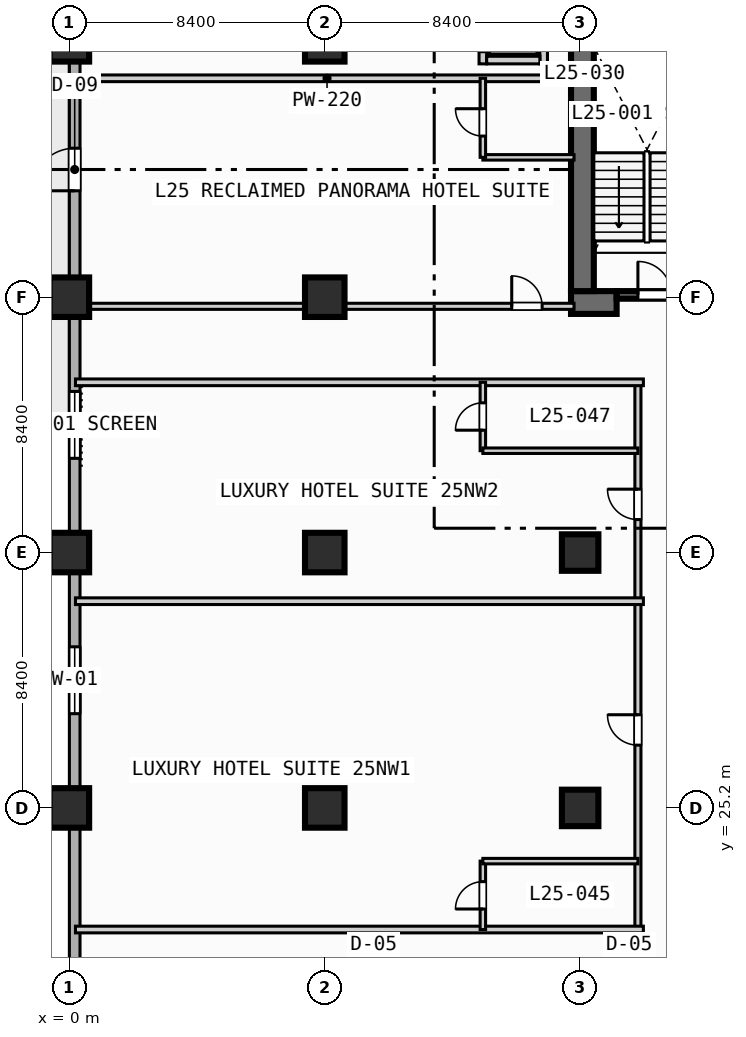
"""IFC4 building model, lengths in metres.
Left out: names, types, materials, properties, quantities, classifications, styles, units other than length and angle.
Written with IfcOpenShell. Run it as: python <this file> out.ifc"""

import sys

from ifc_helpers import new_model, si_unit, direction, frame, frame_2d, origin, origin_2d, place, context, subcontext, project, spatial, rectangle, extrude, element, fill, save


model = new_model("IFC4")
c1 = context("Model", 3, precision=1e-05, world=origin(), true_north=direction((0.0, 1.0)))
c2 = subcontext(c1, "Body", "Model", "MODEL_VIEW")
j1 = project(units=[si_unit("LENGTHUNIT", "METRE"), si_unit("PLANEANGLEUNIT", "RADIAN")], contexts=[c1])
p1 = place(None, origin())
s1 = spatial("IfcSite", under=j1, at=p1, CompositionType="ELEMENT")
p2 = place(p1, origin())
s2 = spatial("IfcBuilding", under=s1, at=p2, CompositionType="ELEMENT")
p3 = place(p2, frame((0.0, 0.0, 107.6)))
s3 = spatial("IfcBuildingStorey", under=s2, at=p3, CompositionType="ELEMENT", Elevation=107.6)
p4 = place(p3, frame((16.5, 41.825, 0.0), z_axis=(0.0, 0.0, 1.0), x_axis=(1.0, 0.0, 0.0)))
e1 = element("IfcWall", 1, at=p4, inside=s3, PredefinedType="SHEAR", context=c2, shape_type="SweptSolid", body=[
    extrude(rectangle(XDim=1.5, YDim=0.75, at=frame_2d((0.75, 0.0))), origin(), (0.0, 0.0, 1.0), 3.55),
])
p5 = place(p3, frame((16.875, 42.2, 0.0), z_axis=(0.0, 0.0, 1.0), x_axis=(0.0, 1.0, 0.0)))
e2 = element("IfcWall", 2, at=p5, inside=s3, PredefinedType="SHEAR", context=c2, shape_type="SweptSolid", body=[
    extrude(rectangle(XDim=16.35, YDim=0.75, at=frame_2d((8.175, 0.0))), origin(), (0.0, 0.0, 1.0), 3.55),
])
for number, where, z_axis, x_axis in (
    (3, (0.0, 25.2, 0.0), (0.0, 0.0, 1.0), (1.0, 0.0, 0.0)),
    (4, (0.0, 33.6, 0.0), (0.0, 0.0, 1.0), (1.0, 0.0, 0.0)),
    (5, (0.0, 42.0, 0.0), (0.0, 0.0, 1.0), (1.0, 0.0, 0.0)),
    (6, (0.0, 50.4, 0.0), (0.0, 0.0, 1.0), (1.0, 0.0, 0.0)),
    (7, (8.4, 25.2, 0.0), (0.0, 0.0, 1.0), (1.0, 0.0, 0.0)),
    (8, (8.4, 33.6, 0.0), (0.0, 0.0, 1.0), (1.0, 0.0, 0.0)),
    (9, (8.4, 42.0, 0.0), (0.0, 0.0, 1.0), (1.0, 0.0, 0.0)),
    (10, (8.4, 50.4, 0.0), (0.0, 0.0, 1.0), (1.0, 0.0, 0.0)),
):
    element("IfcColumn", number, at=place(p3, frame(where, z_axis=z_axis, x_axis=x_axis)), inside=s3, PredefinedType="COLUMN", context=c2, shape_type="SweptSolid", body=[
        extrude(rectangle(XDim=1.3, YDim=1.3, at=origin_2d()), origin(), (0.0, 0.0, 1.0), 3.8),
    ])
for number, where, z_axis, x_axis in (
    (11, (16.8, 25.2, 0.0), (0.0, 0.0, 1.0), (1.0, 0.0, 0.0)),
    (12, (16.8, 33.6, 0.0), (0.0, 0.0, 1.0), (1.0, 0.0, 0.0)),
):
    element("IfcColumn", number, at=place(p3, frame(where, z_axis=z_axis, x_axis=x_axis)), inside=s3, PredefinedType="COLUMN", context=c2, shape_type="SweptSolid", body=[
        extrude(rectangle(XDim=1.2, YDim=1.2, at=origin_2d()), origin(), (0.0, 0.0, 1.0), 3.8),
    ])
p6 = place(p3, frame((0.175, 3.175, 0.0), z_axis=(0.0, 0.0, 1.0), x_axis=(0.0, 1.0, 0.0)))
e13 = element("IfcWall", 13, at=p6, inside=s3, PredefinedType="STANDARD", context=c2, shape_type="SweptSolid", body=[
    extrude(rectangle(XDim=86.05, YDim=0.35, at=frame_2d((43.025, 0.0))), origin(), (0.0, 0.0, 1.0), 3.55),
])
p7 = place(p6, frame((42.325, 0.0, 0.0)))
e14 = element("IfcOpeningElement", 14, at=p7, cuts=e13, PredefinedType="OPENING", context=c2, shape_type="SweptSolid", body=[
    extrude(rectangle(XDim=1.4, YDim=2.2, at=frame_2d((0.7, 1.1))), frame((0.0, 0.185, 0.0), z_axis=(0.0, -1.0, 0.0), x_axis=(1.0, 0.0, 0.0)), (0.0, 0.0, 1.0), 0.37),
])
p8 = place(p6, frame((25.125, 0.0, 0.85)))
e15 = element("IfcOpeningElement", 15, at=p8, cuts=e13, PredefinedType="OPENING", context=c2, shape_type="SweptSolid", body=[
    extrude(rectangle(XDim=2.2, YDim=1.8, at=frame_2d((1.1, 0.9))), frame((0.0, 0.185, 0.0), z_axis=(0.0, -1.0, 0.0), x_axis=(1.0, 0.0, 0.0)), (0.0, 0.0, 1.0), 0.37),
])
p9 = place(p6, frame((33.525, 0.0, 0.85)))
e16 = element("IfcOpeningElement", 16, at=p9, cuts=e13, PredefinedType="OPENING", context=c2, shape_type="SweptSolid", body=[
    extrude(rectangle(XDim=2.2, YDim=1.8, at=frame_2d((1.1, 0.9))), frame((0.0, 0.185, 0.0), z_axis=(0.0, -1.0, 0.0), x_axis=(1.0, 0.0, 0.0)), (0.0, 0.0, 1.0), 0.37),
])
p10 = place(p6, frame((58.725, 0.0, 0.85)))
e17 = element("IfcOpeningElement", 17, at=p10, cuts=e13, PredefinedType="OPENING", context=c2, shape_type="SweptSolid", body=[
    extrude(rectangle(XDim=2.2, YDim=1.8, at=frame_2d((1.1, 0.9))), frame((0.0, 0.185, 0.0), z_axis=(0.0, -1.0, 0.0), x_axis=(1.0, 0.0, 0.0)), (0.0, 0.0, 1.0), 0.37),
])
p11 = place(p6, frame((65.125, 0.0, 0.85)))
e18 = element("IfcOpeningElement", 18, at=p11, cuts=e13, PredefinedType="OPENING", context=c2, shape_type="SweptSolid", body=[
    extrude(rectangle(XDim=1.8, YDim=1.8, at=frame_2d((0.9, 0.9))), frame((0.0, 0.185, 0.0), z_axis=(0.0, -1.0, 0.0), x_axis=(1.0, 0.0, 0.0)), (0.0, 0.0, 1.0), 0.37),
])
p12 = place(p6, frame((73.275, 0.0, 0.85)))
e19 = element("IfcOpeningElement", 19, at=p12, cuts=e13, PredefinedType="OPENING", context=c2, shape_type="SweptSolid", body=[
    extrude(rectangle(XDim=1.8, YDim=1.8, at=frame_2d((0.9, 0.9))), frame((0.0, 0.185, 0.0), z_axis=(0.0, -1.0, 0.0), x_axis=(1.0, 0.0, 0.0)), (0.0, 0.0, 1.0), 0.37),
])
p13 = place(p6, frame((81.625, 0.0, 0.85)))
e20 = element("IfcOpeningElement", 20, at=p13, cuts=e13, PredefinedType="OPENING", context=c2, shape_type="SweptSolid", body=[
    extrude(rectangle(XDim=1.8, YDim=1.8, at=frame_2d((0.9, 0.9))), frame((0.0, 0.185, 0.0), z_axis=(0.0, -1.0, 0.0), x_axis=(1.0, 0.0, 0.0)), (0.0, 0.0, 1.0), 0.37),
])
p14 = place(p3, frame((18.0, 42.075, 0.0), z_axis=(0.0, 0.0, 1.0), x_axis=(1.0, 0.0, 0.0)))
e21 = element("IfcWall", 21, at=p14, inside=s3, PredefinedType="SOLIDWALL", context=c2, shape_type="SweptSolid", body=[
    extrude(rectangle(XDim=2.5, YDim=0.25, at=frame_2d((1.25, 0.0))), origin(), (0.0, 0.0, 1.0), 3.55),
])
p15 = place(p14, frame((0.7, 0.0, 0.0)))
e22 = element("IfcOpeningElement", 22, at=p15, cuts=e21, PredefinedType="OPENING", context=c2, shape_type="SweptSolid", body=[
    extrude(rectangle(XDim=1.1, YDim=2.15, at=frame_2d((0.55, 1.075))), frame((0.0, 0.135, 0.0), z_axis=(0.0, -1.0, 0.0), x_axis=(1.0, 0.0, 0.0)), (0.0, 0.0, 1.0), 0.27),
])
p16 = place(p3, frame((13.6, 49.675, 0.0), z_axis=(0.0, 0.0, 1.0), x_axis=(0.0, 1.0, 0.0)))
e23 = element("IfcWall", 23, at=p16, inside=s3, PredefinedType="SOLIDWALL", context=c2, shape_type="SweptSolid", body=[
    extrude(rectangle(XDim=2.75, YDim=0.25, at=frame_2d((1.375, 0.0))), origin(), (0.0, 0.0, 1.0), 3.55),
])
p17 = place(p16, frame((0.4, 0.0, 0.0)))
e24 = element("IfcOpeningElement", 24, at=p17, cuts=e23, PredefinedType="OPENING", context=c2, shape_type="SweptSolid", body=[
    extrude(rectangle(XDim=1.1, YDim=2.15, at=frame_2d((0.55, 1.075))), frame((0.0, 0.135, 0.0), z_axis=(0.0, -1.0, 0.0), x_axis=(1.0, 0.0, 0.0)), (0.0, 0.0, 1.0), 0.27),
])
p18 = place(p3, frame((15.6, 49.675, 0.0), z_axis=(0.0, 0.0, 1.0), x_axis=(0.0, 1.0, 0.0)))
e25 = element("IfcWall", 25, at=p18, inside=s3, PredefinedType="SOLIDWALL", context=c2, shape_type="SweptSolid", body=[
    extrude(rectangle(XDim=2.75, YDim=0.25, at=frame_2d((1.375, 0.0))), origin(), (0.0, 0.0, 1.0), 3.55),
])
p19 = place(p3, frame((13.725, 49.8, 0.0), z_axis=(0.0, 0.0, 1.0), x_axis=(1.0, 0.0, 0.0)))
e26 = element("IfcWall", 26, at=p19, inside=s3, PredefinedType="SOLIDWALL", context=c2, shape_type="SweptSolid", body=[
    extrude(rectangle(XDim=1.75, YDim=0.25, at=frame_2d((0.875, 0.0))), origin(), (0.0, 0.0, 1.0), 3.55),
])
p20 = place(p3, frame((0.35, 41.7, 0.0), z_axis=(0.0, 0.0, 1.0), x_axis=(1.0, 0.0, 0.0)))
e27 = element("IfcWall", 27, at=p20, inside=s3, PredefinedType="PARTITIONING", context=c2, shape_type="SweptSolid", body=[
    extrude(rectangle(XDim=16.25, YDim=0.2, at=frame_2d((8.125, 0.0))), origin(), (0.0, 0.0, 1.0), 2.8),
])
p21 = place(p20, frame((14.2, 0.0, 0.0)))
e28 = element("IfcOpeningElement", 28, at=p21, cuts=e27, PredefinedType="OPENING", context=c2, shape_type="SweptSolid", body=[
    extrude(rectangle(XDim=1.0, YDim=2.15, at=frame_2d((0.5, 1.075))), frame((0.0, 0.11, 0.0), z_axis=(0.0, -1.0, 0.0), x_axis=(1.0, 0.0, 0.0)), (0.0, 0.0, 1.0), 0.22),
])
p22 = place(p3, frame((0.35, 49.2, 0.0), z_axis=(0.0, 0.0, 1.0), x_axis=(1.0, 0.0, 0.0)))
e29 = element("IfcWall", 29, at=p22, inside=s3, PredefinedType="PARTITIONING", context=c2, shape_type="SweptSolid", body=[
    extrude(rectangle(XDim=16.25, YDim=0.22, at=frame_2d((8.125, 0.0))), origin(), (0.0, 0.0, 1.0), 3.55),
])
p23 = place(p3, frame((13.6, 46.6, 0.0), z_axis=(0.0, 0.0, 1.0), x_axis=(1.0, 0.0, 0.0)))
e30 = element("IfcWall", 30, at=p23, inside=s3, PredefinedType="PLUMBINGWALL", context=c2, shape_type="SweptSolid", body=[
    extrude(rectangle(XDim=3.0, YDim=0.18, at=frame_2d((1.5, 0.0))), origin(), (0.0, 0.0, 1.0), 3.55),
])
p24 = place(p3, frame((13.6, 46.6, 0.0), z_axis=(0.0, 0.0, 1.0), x_axis=(0.0, 1.0, 0.0)))
e31 = element("IfcWall", 31, at=p24, inside=s3, PredefinedType="PLUMBINGWALL", context=c2, shape_type="SweptSolid", body=[
    extrude(rectangle(XDim=2.6, YDim=0.18, at=frame_2d((1.3, 0.0))), origin(), (0.0, 0.0, 1.0), 3.55),
])
p25 = place(p24, frame((0.7, 0.0, 0.0)))
e32 = element("IfcOpeningElement", 32, at=p25, cuts=e31, PredefinedType="OPENING", context=c2, shape_type="SweptSolid", body=[
    extrude(rectangle(XDim=0.9, YDim=2.1, at=frame_2d((0.45, 1.05))), frame((0.0, 0.1, 0.0), z_axis=(0.0, -1.0, 0.0), x_axis=(1.0, 0.0, 0.0)), (0.0, 0.0, 1.0), 0.2),
])
p26 = place(p3, frame((18.7, 21.2, 0.0), z_axis=(0.0, 0.0, 1.0), x_axis=(0.0, 1.0, 0.0)))
e33 = element("IfcWall", 33, at=p26, inside=s3, PredefinedType="PARTITIONING", context=c2, shape_type="SweptSolid", body=[
    extrude(rectangle(XDim=18.0, YDim=0.2, at=frame_2d((9.0, 0.0))), origin(), (0.0, 0.0, 1.0), 3.55),
])
p27 = place(p26, frame((6.065, 0.0, 0.0)))
e34 = element("IfcOpeningElement", 34, at=p27, cuts=e33, PredefinedType="OPENING", context=c2, shape_type="SweptSolid", body=[
    extrude(rectangle(XDim=1.0, YDim=2.15, at=frame_2d((0.5, 1.075))), frame((0.0, 0.11, 0.0), z_axis=(0.0, -1.0, 0.0), x_axis=(1.0, 0.0, 0.0)), (0.0, 0.0, 1.0), 0.22),
])
p28 = place(p26, frame((13.485, 0.0, 0.0)))
e35 = element("IfcOpeningElement", 35, at=p28, cuts=e33, PredefinedType="OPENING", context=c2, shape_type="SweptSolid", body=[
    extrude(rectangle(XDim=1.0, YDim=2.15, at=frame_2d((0.5, 1.075))), frame((0.0, 0.11, 0.0), z_axis=(0.0, -1.0, 0.0), x_axis=(1.0, 0.0, 0.0)), (0.0, 0.0, 1.0), 0.22),
])
p29 = place(p3, frame((0.2, 21.2, 0.0), z_axis=(0.0, 0.0, 1.0), x_axis=(1.0, 0.0, 0.0)))
e36 = element("IfcWall", 36, at=p29, inside=s3, PredefinedType="PARTITIONING", context=c2, shape_type="SweptSolid", body=[
    extrude(rectangle(XDim=18.68, YDim=0.22, at=frame_2d((9.34, 0.0))), origin(), (0.0, 0.0, 1.0), 3.55),
])
p30 = place(p3, frame((13.6, 21.2, 0.0), z_axis=(0.0, 0.0, 1.0), x_axis=(0.0, 1.0, 0.0)))
e37 = element("IfcWall", 37, at=p30, inside=s3, PredefinedType="PLUMBINGWALL", context=c2, shape_type="SweptSolid", body=[
    extrude(rectangle(XDim=2.25, YDim=0.18, at=frame_2d((1.125, 0.0))), origin(), (0.0, 0.0, 1.0), 3.55),
])
p31 = place(p30, frame((0.675, 0.0, 0.0)))
e38 = element("IfcOpeningElement", 38, at=p31, cuts=e37, PredefinedType="OPENING", context=c2, shape_type="SweptSolid", body=[
    extrude(rectangle(XDim=0.9, YDim=2.1, at=frame_2d((0.45, 1.05))), frame((0.0, 0.1, 0.0), z_axis=(0.0, -1.0, 0.0), x_axis=(1.0, 0.0, 0.0)), (0.0, 0.0, 1.0), 0.2),
])
p32 = place(p3, frame((13.6, 23.45, 0.0), z_axis=(0.0, 0.0, 1.0), x_axis=(1.0, 0.0, 0.0)))
e39 = element("IfcWall", 39, at=p32, inside=s3, PredefinedType="PLUMBINGWALL", context=c2, shape_type="SweptSolid", body=[
    extrude(rectangle(XDim=5.1, YDim=0.18, at=frame_2d((2.55, 0.0))), origin(), (0.0, 0.0, 1.0), 3.55),
])
for number, where, z_axis, x_axis in (
    (40, (0.2, 32.0, 0.0), (0.0, 0.0, 1.0), (1.0, 0.0, 0.0)),
    (41, (0.2, 39.2, 0.0), (0.0, 0.0, 1.0), (1.0, 0.0, 0.0)),
):
    element("IfcWall", number, at=place(p3, frame(where, z_axis=z_axis, x_axis=x_axis)), inside=s3, PredefinedType="PARTITIONING", context=c2, shape_type="SweptSolid", body=[
        extrude(rectangle(XDim=18.68, YDim=0.22, at=frame_2d((9.34, 0.0))), origin(), (0.0, 0.0, 1.0), 3.55),
    ])
p33 = place(p3, frame((13.6, 36.95, 0.0), z_axis=(0.0, 0.0, 1.0), x_axis=(0.0, 1.0, 0.0)))
e42 = element("IfcWall", 42, at=p33, inside=s3, PredefinedType="PLUMBINGWALL", context=c2, shape_type="SweptSolid", body=[
    extrude(rectangle(XDim=2.25, YDim=0.18, at=frame_2d((1.125, 0.0))), origin(), (0.0, 0.0, 1.0), 3.55),
])
p34 = place(p33, frame((0.675, 0.0, 0.0)))
e43 = element("IfcOpeningElement", 43, at=p34, cuts=e42, PredefinedType="OPENING", context=c2, shape_type="SweptSolid", body=[
    extrude(rectangle(XDim=0.9, YDim=2.1, at=frame_2d((0.45, 1.05))), frame((0.0, 0.1, 0.0), z_axis=(0.0, -1.0, 0.0), x_axis=(1.0, 0.0, 0.0)), (0.0, 0.0, 1.0), 0.2),
])
p35 = place(p3, frame((13.6, 36.95, 0.0), z_axis=(0.0, 0.0, 1.0), x_axis=(1.0, 0.0, 0.0)))
e44 = element("IfcWall", 44, at=p35, inside=s3, PredefinedType="PLUMBINGWALL", context=c2, shape_type="SweptSolid", body=[
    extrude(rectangle(XDim=5.1, YDim=0.18, at=frame_2d((2.55, 0.0))), origin(), (0.0, 0.0, 1.0), 3.55),
])
p36 = place(p7, origin())
e45 = element("IfcDoor", 45, at=p36, inside=s3, OperationType="SINGLE_SWING_LEFT", PredefinedType="DOOR", context=c2, shape_type="SweptSolid", body=[
    extrude(rectangle(XDim=1.4, YDim=2.2, at=frame_2d((0.7, 1.1))), frame((0.0, 0.025, 0.0), z_axis=(0.0, -1.0, 0.0), x_axis=(1.0, 0.0, 0.0)), (0.0, 0.0, 1.0), 0.05),
])
fill(e14, e45)
p37 = place(p8, origin())
e46 = element("IfcWindow", 46, at=p37, inside=s3, PartitioningType="SINGLE_PANEL", PredefinedType="WINDOW", context=c2, shape_type="SweptSolid", body=[
    extrude(rectangle(XDim=2.2, YDim=1.8, at=frame_2d((1.1, 0.9))), frame((0.0, 0.03, 0.0), z_axis=(0.0, -1.0, 0.0), x_axis=(1.0, 0.0, 0.0)), (0.0, 0.0, 1.0), 0.06),
])
fill(e15, e46)
p38 = place(p9, origin())
e47 = element("IfcWindow", 47, at=p38, inside=s3, PartitioningType="SINGLE_PANEL", PredefinedType="WINDOW", context=c2, shape_type="SweptSolid", body=[
    extrude(rectangle(XDim=2.2, YDim=1.8, at=frame_2d((1.1, 0.9))), frame((0.0, 0.03, 0.0), z_axis=(0.0, -1.0, 0.0), x_axis=(1.0, 0.0, 0.0)), (0.0, 0.0, 1.0), 0.06),
])
fill(e16, e47)
p39 = place(p15, origin())
e48 = element("IfcDoor", 48, at=p39, inside=s3, OperationType="SINGLE_SWING_LEFT", PredefinedType="DOOR", context=c2, shape_type="SweptSolid", body=[
    extrude(rectangle(XDim=1.1, YDim=2.15, at=frame_2d((0.55, 1.075))), frame((0.0, 0.025, 0.0), z_axis=(0.0, -1.0, 0.0), x_axis=(1.0, 0.0, 0.0)), (0.0, 0.0, 1.0), 0.05),
])
fill(e22, e48)
p40 = place(p21, origin())
e49 = element("IfcDoor", 49, at=p40, inside=s3, OperationType="SINGLE_SWING_LEFT", PredefinedType="DOOR", context=c2, shape_type="SweptSolid", body=[
    extrude(rectangle(XDim=1.0, YDim=2.15, at=frame_2d((0.5, 1.075))), frame((0.0, 0.025, 0.0), z_axis=(0.0, -1.0, 0.0), x_axis=(1.0, 0.0, 0.0)), (0.0, 0.0, 1.0), 0.05),
])
fill(e28, e49)
p41 = place(p25, origin())
e50 = element("IfcDoor", 50, at=p41, inside=s3, OperationType="SINGLE_SWING_RIGHT", PredefinedType="DOOR", context=c2, shape_type="SweptSolid", body=[
    extrude(rectangle(XDim=0.9, YDim=2.1, at=frame_2d((0.45, 1.05))), frame((0.0, 0.025, 0.0), z_axis=(0.0, -1.0, 0.0), x_axis=(1.0, 0.0, 0.0)), (0.0, 0.0, 1.0), 0.05),
])
fill(e32, e50)
p42 = place(p27, origin())
e51 = element("IfcDoor", 51, at=p42, inside=s3, OperationType="SINGLE_SWING_RIGHT", PredefinedType="DOOR", context=c2, shape_type="SweptSolid", body=[
    extrude(rectangle(XDim=1.0, YDim=2.15, at=frame_2d((0.5, 1.075))), frame((0.0, 0.025, 0.0), z_axis=(0.0, -1.0, 0.0), x_axis=(1.0, 0.0, 0.0)), (0.0, 0.0, 1.0), 0.05),
])
fill(e34, e51)
p43 = place(p28, origin())
e52 = element("IfcDoor", 52, at=p43, inside=s3, OperationType="SINGLE_SWING_RIGHT", PredefinedType="DOOR", context=c2, shape_type="SweptSolid", body=[
    extrude(rectangle(XDim=1.0, YDim=2.15, at=frame_2d((0.5, 1.075))), frame((0.0, 0.025, 0.0), z_axis=(0.0, -1.0, 0.0), x_axis=(1.0, 0.0, 0.0)), (0.0, 0.0, 1.0), 0.05),
])
fill(e35, e52)
p44 = place(p31, origin())
e53 = element("IfcDoor", 53, at=p44, inside=s3, OperationType="SINGLE_SWING_LEFT", PredefinedType="DOOR", context=c2, shape_type="SweptSolid", body=[
    extrude(rectangle(XDim=0.9, YDim=2.1, at=frame_2d((0.45, 1.05))), frame((0.0, 0.025, 0.0), z_axis=(0.0, -1.0, 0.0), x_axis=(1.0, 0.0, 0.0)), (0.0, 0.0, 1.0), 0.05),
])
fill(e38, e53)
p45 = place(p34, origin())
e54 = element("IfcDoor", 54, at=p45, inside=s3, OperationType="SINGLE_SWING_LEFT", PredefinedType="DOOR", context=c2, shape_type="SweptSolid", body=[
    extrude(rectangle(XDim=0.9, YDim=2.1, at=frame_2d((0.45, 1.05))), frame((0.0, 0.025, 0.0), z_axis=(0.0, -1.0, 0.0), x_axis=(1.0, 0.0, 0.0)), (0.0, 0.0, 1.0), 0.05),
])
fill(e43, e54)
save(model, sys.argv[1])
